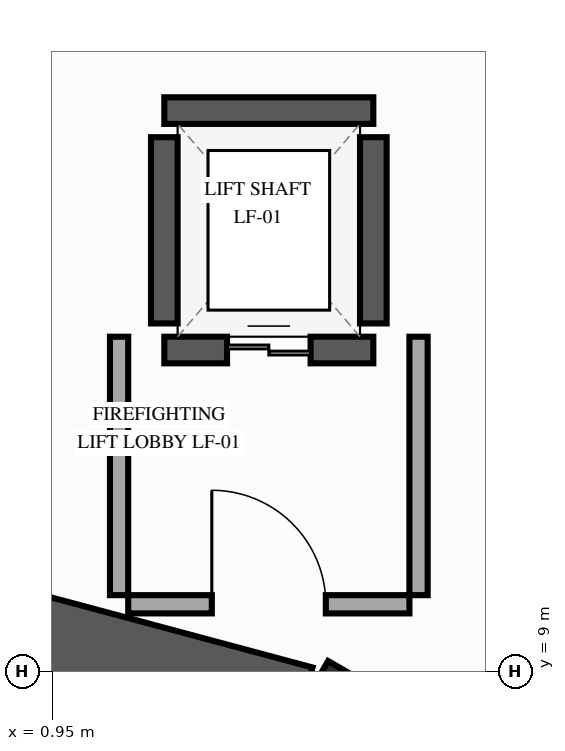
"""IFC4 building model, lengths in metres.
Left out: names, types, materials, properties, quantities, classifications, styles, units other than length and angle.
Written with IfcOpenShell. Run it as: python <this file> out.ifc"""

import sys

from ifc_helpers import new_model, si_unit, direction, frame, frame_2d, origin, origin_2d, place, context, subcontext, project, spatial, rectangle, extrude, element, fill, save


model = new_model("IFC4")
c1 = context("Model", 3, precision=1e-05, world=origin(), true_north=direction((0.0, 1.0)))
c2 = subcontext(c1, "Body", "Model", "MODEL_VIEW")
j1 = project(units=[si_unit("LENGTHUNIT", "METRE"), si_unit("PLANEANGLEUNIT", "RADIAN")], contexts=[c1])
p1 = place(None, origin())
s1 = spatial("IfcSite", under=j1, at=p1, CompositionType="ELEMENT")
p2 = place(p1, origin())
s2 = spatial("IfcBuilding", under=s1, at=p2, CompositionType="ELEMENT")
p3 = place(p2, frame((0.0, 0.0, -6.0)))
s3 = spatial("IfcBuildingStorey", under=s2, at=p3, CompositionType="ELEMENT", Elevation=-6.0)
p4 = place(p3, frame((4.8, 8.314, 0.0), z_axis=(0.0, 0.0, 1.0), x_axis=(0.5, 0.866025403784, 0.0)))
e1 = element("IfcColumn", 1, at=p4, inside=s3, PredefinedType="COLUMN", context=c2, shape_type="SweptSolid", body=[
    extrude(rectangle(XDim=1.2, YDim=1.2, at=origin_2d()), origin(), (0.0, 0.0, 1.0), 6.0),
])
p5 = place(p3, frame((4.22, 8.469, 0.0), z_axis=(0.0, 0.0, 1.0), x_axis=(-0.965874862682, 0.259009169026, 0.0)))
e2 = element("IfcWall", 2, at=p5, inside=s3, PredefinedType="SHEAR", context=c2, shape_type="SweptSolid", body=[
    extrude(rectangle(XDim=3.769, YDim=1.2, at=frame_2d((1.884, 0.0))), origin(), (0.0, 0.0, 1.0), 5.6),
])
p6 = place(p3, frame((2.425, 13.225, 0.0), z_axis=(0.0, 0.0, 1.0), x_axis=(1.0, 0.0, 0.0)))
e3 = element("IfcWall", 3, at=p6, inside=s3, PredefinedType="SHEAR", context=c2, shape_type="SweptSolid", body=[
    extrude(rectangle(XDim=2.75, YDim=0.35, at=frame_2d((1.375, 0.0))), origin(), (0.0, 0.0, 1.0), 5.7),
])
p7 = place(p6, frame((0.825, 0.0, 0.0)))
e4 = element("IfcOpeningElement", 4, at=p7, cuts=e3, PredefinedType="OPENING", context=c2, shape_type="SweptSolid", body=[
    extrude(rectangle(XDim=1.1, YDim=2.2, at=frame_2d((0.55, 1.1))), frame((0.0, 0.185, 0.0), z_axis=(0.0, -1.0, 0.0), x_axis=(1.0, 0.0, 0.0)), (0.0, 0.0, 1.0), 0.37),
])
p8 = place(p3, frame((5.175, 16.375, 0.0), z_axis=(0.0, 0.0, 1.0), x_axis=(-1.0, 0.0, 0.0)))
e5 = element("IfcWall", 5, at=p8, inside=s3, PredefinedType="SHEAR", context=c2, shape_type="SweptSolid", body=[
    extrude(rectangle(XDim=2.75, YDim=0.35, at=frame_2d((1.375, 0.0))), origin(), (0.0, 0.0, 1.0), 5.7),
])
for number, where, z_axis, x_axis in (
    (6, (2.425, 13.575, 0.0), (0.0, 0.0, 1.0), (0.0, 1.0, 0.0)),
    (7, (5.175, 13.575, 0.0), (0.0, 0.0, 1.0), (0.0, 1.0, 0.0)),
):
    element("IfcWall", number, at=place(p3, frame(where, z_axis=z_axis, x_axis=x_axis)), inside=s3, PredefinedType="SHEAR", context=c2, shape_type="SweptSolid", body=[
        extrude(rectangle(XDim=2.45, YDim=0.35, at=frame_2d((1.225, 0.0))), origin(), (0.0, 0.0, 1.0), 5.7),
    ])
p9 = place(p3, frame((1.95, 9.88, 0.0), z_axis=(0.0, 0.0, 1.0), x_axis=(1.0, 0.0, 0.0)))
e8 = element("IfcWall", 8, at=p9, inside=s3, PredefinedType="PARTITIONING", context=c2, shape_type="SweptSolid", body=[
    extrude(rectangle(XDim=3.7, YDim=0.24, at=frame_2d((1.85, 0.0))), origin(), (0.0, 0.0, 1.0), 4.885),
])
p10 = place(p9, frame((1.1, 0.0, 0.0)))
e9 = element("IfcOpeningElement", 9, at=p10, cuts=e8, PredefinedType="OPENING", context=c2, shape_type="SweptSolid", body=[
    extrude(rectangle(XDim=1.5, YDim=2.2, at=frame_2d((0.75, 1.1))), frame((0.0, 0.13, 0.0), z_axis=(0.0, -1.0, 0.0), x_axis=(1.0, 0.0, 0.0)), (0.0, 0.0, 1.0), 0.26),
])
p11 = place(p3, frame((1.83, 10.0, 0.0), z_axis=(0.0, 0.0, 1.0), x_axis=(0.0, 1.0, 0.0)))
e10 = element("IfcWall", 10, at=p11, inside=s3, PredefinedType="PARTITIONING", context=c2, shape_type="SweptSolid", body=[
    extrude(rectangle(XDim=3.4, YDim=0.24, at=frame_2d((1.7, 0.0))), origin(), (0.0, 0.0, 1.0), 5.585),
])
p12 = place(p3, frame((5.77, 10.0, 0.0), z_axis=(0.0, 0.0, 1.0), x_axis=(0.0, 1.0, 0.0)))
e11 = element("IfcWall", 11, at=p12, inside=s3, PredefinedType="PARTITIONING", context=c2, shape_type="SweptSolid", body=[
    extrude(rectangle(XDim=3.4, YDim=0.24, at=frame_2d((1.7, 0.0))), origin(), (0.0, 0.0, 1.0), 4.885),
])
p13 = place(p3, frame((1.8, 8.442, 0.0), z_axis=(0.0, 0.0, 1.0), x_axis=(-0.96625012275, 0.257605707012, 0.0)))
e12 = element("IfcWall", 12, at=p13, inside=s3, PredefinedType="PARTITIONING", context=c2, shape_type="SweptSolid", body=[
    extrude(rectangle(XDim=1.868, YDim=0.18, at=frame_2d((0.934, 0.0))), origin(), (0.0, 0.0, 1.0), 5.585),
])
p14 = place(p7, origin())
e13 = element("IfcDoor", 13, at=p14, inside=s3, OperationType="DOUBLE_DOOR_SLIDING", PredefinedType="DOOR", context=c2, shape_type="SweptSolid", body=[
    extrude(rectangle(XDim=1.1, YDim=2.2, at=frame_2d((0.55, 1.1))), frame((0.0, 0.025, 0.0), z_axis=(0.0, -1.0, 0.0), x_axis=(1.0, 0.0, 0.0)), (0.0, 0.0, 1.0), 0.05),
])
fill(e4, e13)
p15 = place(p10, origin())
e14 = element("IfcDoor", 14, at=p15, inside=s3, OperationType="SINGLE_SWING_LEFT", PredefinedType="DOOR", context=c2, shape_type="SweptSolid", body=[
    extrude(rectangle(XDim=1.5, YDim=2.2, at=frame_2d((0.75, 1.1))), frame((0.0, 0.025, 0.0), z_axis=(0.0, -1.0, 0.0), x_axis=(1.0, 0.0, 0.0)), (0.0, 0.0, 1.0), 0.05),
])
fill(e9, e14)
save(model, sys.argv[1])
